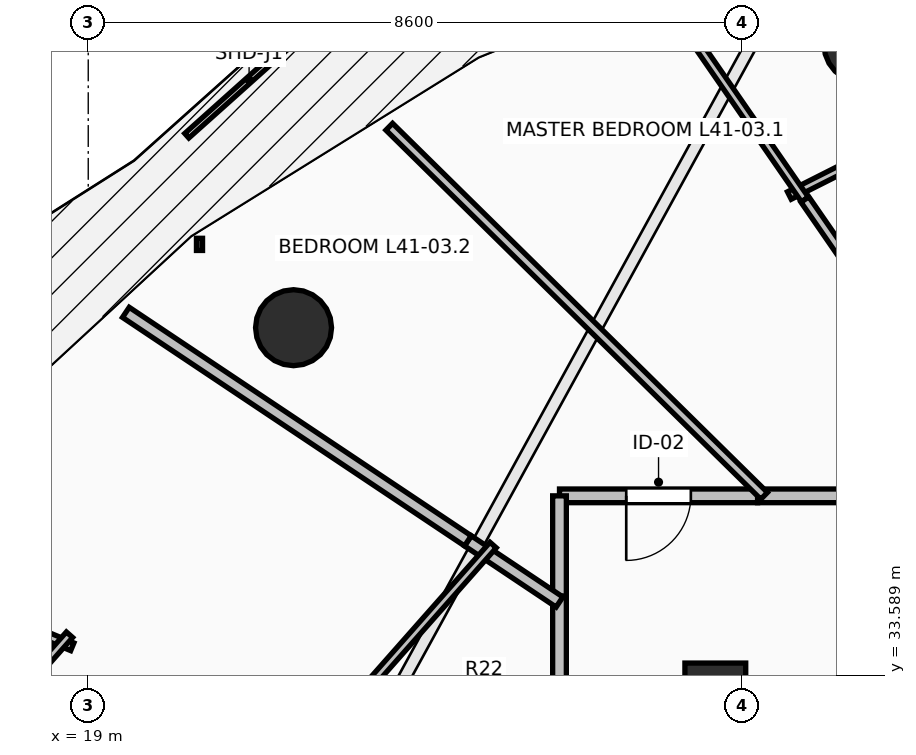
"""IFC4 building model, lengths in metres.
Left out: names, types, materials, properties, quantities, classifications, styles, units other than length and angle.
Written with IfcOpenShell. Run it as: python <this file> out.ifc"""

import sys

from ifc_helpers import new_model, si_unit, direction, frame, frame_2d, origin, origin_2d, place, context, subcontext, project, spatial, rectangle, circle, extrude, element, fill, save


model = new_model("IFC4")
c1 = context("Model", 3, precision=1e-05, world=origin(), true_north=direction((0.0, 1.0)))
c2 = subcontext(c1, "Body", "Model", "MODEL_VIEW")
j1 = project(units=[si_unit("LENGTHUNIT", "METRE"), si_unit("PLANEANGLEUNIT", "RADIAN")], contexts=[c1])
p1 = place(None, origin())
s1 = spatial("IfcSite", under=j1, at=p1, CompositionType="ELEMENT")
p2 = place(p1, origin())
s2 = spatial("IfcBuilding", under=s1, at=p2, CompositionType="ELEMENT")
p3 = place(p2, frame((0.0, 0.0, 153.6)))
s3 = spatial("IfcBuildingStorey", under=s2, at=p3, CompositionType="ELEMENT", Elevation=153.6)
for number, where, z_axis, x_axis in (
    (1, (29.179, 41.891, 0.0), (0.0, 0.0, 1.0), (-0.383, 0.924, 0.0)),
    (2, (21.701, 38.162, 0.0), (0.0, 0.0, 1.0), (-0.707, 0.707, 0.0)),
):
    element("IfcColumn", number, at=place(p3, frame(where, z_axis=z_axis, x_axis=x_axis)), inside=s3, PredefinedType="COLUMN", context=c2, shape_type="SweptSolid", body=[
        extrude(circle(Radius=0.5, at=origin_2d()), origin(), (0.0, 0.0, 1.0), 3.5),
    ])
p4 = place(p3, frame((27.25, 33.15, 0.0), z_axis=(0.0, 0.0, 1.0), x_axis=(1.0, 0.0, 0.0)))
e3 = element("IfcColumn", 3, at=p4, inside=s3, PredefinedType="PILASTER", context=c2, shape_type="SweptSolid", body=[
    extrude(rectangle(XDim=0.8, YDim=1.2, at=origin_2d()), origin(), (0.0, 0.0, 1.0), 3.5),
])
p5 = place(p3, frame((31.05, 35.95, 0.0), z_axis=(0.0, 0.0, 1.0), x_axis=(-1.0, 0.0, 0.0)))
e4 = element("IfcWall", 4, at=p5, inside=s3, PredefinedType="PARTITIONING", context=c2, shape_type="SweptSolid", body=[
    extrude(rectangle(XDim=3.244, YDim=0.18, at=frame_2d((1.622, 0.0))), origin(), (0.0, 0.0, 1.0), 2.432),
])
p6 = place(p3, frame((27.806, 35.95, 0.0), z_axis=(0.0, 0.0, 1.0), x_axis=(-1.0, 0.0, 0.0)))
e5 = element("IfcWall", 5, at=p6, inside=s3, PredefinedType="PARTITIONING", context=c2, shape_type="SweptSolid", body=[
    extrude(rectangle(XDim=2.606, YDim=0.18, at=frame_2d((1.303, 0.0))), origin(), (0.0, 0.0, 1.0), 2.432),
])
p7 = place(p6, frame((0.878, 0.0, 0.0)))
e6 = element("IfcOpeningElement", 6, at=p7, cuts=e5, PredefinedType="OPENING", context=c2, shape_type="SweptSolid", body=[
    extrude(rectangle(XDim=0.85, YDim=2.1, at=frame_2d((0.425, 1.05))), frame((0.0, 0.105, 0.0), z_axis=(0.0, -1.0, 0.0), x_axis=(1.0, 0.0, 0.0)), (0.0, 0.0, 1.0), 0.21),
])
p8 = place(p3, frame((25.2, 35.95, 0.0), z_axis=(0.0, 0.0, 1.0), x_axis=(0.0, -1.0, 0.0)))
e7 = element("IfcWall", 7, at=p8, inside=s3, PredefinedType="PARTITIONING", context=c2, shape_type="SweptSolid", body=[
    extrude(rectangle(XDim=1.457, YDim=0.18, at=frame_2d((0.729, 0.0))), origin(), (0.0, 0.0, 1.0), 2.432),
])
p9 = place(p3, frame((25.2, 34.633, 0.0), z_axis=(0.0, 0.0, 1.0), x_axis=(0.0, -1.0, 0.0)))
e8 = element("IfcWall", 8, at=p9, inside=s3, PredefinedType="PARTITIONING", context=c2, shape_type="SweptSolid", body=[
    extrude(rectangle(XDim=3.155, YDim=0.18, at=frame_2d((1.578, 0.0))), origin(), (0.0, 0.0, 1.0), 2.432),
])
p10 = place(p3, frame((30.043, 40.819, 0.0), z_axis=(0.0, 0.0, 1.0), x_axis=(-0.892695055898, -0.450661222179, 0.0)))
e9 = element("IfcWall", 9, at=p10, inside=s3, PredefinedType="PARTITIONING", context=c2, shape_type="SweptSolid", body=[
    extrude(rectangle(XDim=2.038, YDim=0.11, at=frame_2d((1.019, 0.0))), origin(), (0.0, 0.0, 1.0), 2.432),
])
p11 = place(p3, frame((28.429, 39.849, 0.0), z_axis=(0.0, 0.0, 1.0), x_axis=(-0.568554374161, 0.822645685349, 0.0)))
e10 = element("IfcWall", 10, at=p11, inside=s3, PredefinedType="PARTITIONING", context=c2, shape_type="SweptSolid", body=[
    extrude(rectangle(XDim=3.409, YDim=0.11, at=frame_2d((1.705, 0.0))), origin(), (0.0, 0.0, 1.0), 2.728),
])
p12 = place(p3, frame((28.428, 39.849, 0.0), z_axis=(0.0, 0.0, 1.0), x_axis=(0.568542808453, -0.822653678626, 0.0)))
e11 = element("IfcWall", 11, at=p12, inside=s3, PredefinedType="PARTITIONING", context=c2, shape_type="SweptSolid", body=[
    extrude(rectangle(XDim=4.74, YDim=0.125, at=frame_2d((2.37, 0.0))), origin(), (0.0, 0.0, 1.0), 2.432),
])
p13 = place(p12, frame((1.92, 0.0, 0.0)))
e12 = element("IfcOpeningElement", 12, at=p13, cuts=e11, PredefinedType="OPENING", context=c2, shape_type="SweptSolid", body=[
    extrude(rectangle(XDim=0.9, YDim=2.1, at=frame_2d((0.45, 1.05))), frame((0.0, 0.077, 0.0), z_axis=(0.0, -1.0, 0.0), x_axis=(1.0, 0.0, 0.0)), (0.0, 0.0, 1.0), 0.155),
])
p14 = place(p3, frame((22.96, 40.806, 0.0), z_axis=(0.0, 0.0, 1.0), x_axis=(0.712587980465, -0.70158276069, 0.0)))
e13 = element("IfcWall", 13, at=p14, inside=s3, PredefinedType="PARTITIONING", context=c2, shape_type="SweptSolid", body=[
    extrude(rectangle(XDim=6.921, YDim=0.125, at=frame_2d((3.461, 0.0))), origin(), (0.0, 0.0, 1.0), 2.432),
])
p15 = place(p3, frame((23.995, 35.358, 0.0), z_axis=(0.0, 0.0, 1.0), x_axis=(0.831505536539, -0.555516464837, 0.0)))
e14 = element("IfcWall", 14, at=p15, inside=s3, PredefinedType="PARTITIONING", context=c2, shape_type="SweptSolid", body=[
    extrude(rectangle(XDim=1.449, YDim=0.16, at=frame_2d((0.725, 0.0))), origin(), (0.0, 0.0, 1.0), 3.24),
])
p16 = place(p3, frame((19.495, 38.364, 0.0), z_axis=(0.0, 0.0, 1.0), x_axis=(0.831529389247, -0.55548076008, 0.0)))
e15 = element("IfcWall", 15, at=p16, inside=s3, PredefinedType="PARTITIONING", context=c2, shape_type="SweptSolid", body=[
    extrude(rectangle(XDim=5.412, YDim=0.16, at=frame_2d((2.706, 0.0))), origin(), (0.0, 0.0, 1.0), 2.728),
])
p17 = place(p3, frame((22.081, 32.761, 0.0), z_axis=(0.0, 0.0, 1.0), x_axis=(0.662023888113, 0.749482736004, 0.0)))
e16 = element("IfcWall", 16, at=p17, inside=s3, PredefinedType="PARTITIONING", context=c2, shape_type="SweptSolid", body=[
    extrude(rectangle(XDim=3.392, YDim=0.11, at=frame_2d((1.696, 0.0))), origin(), (0.0, 0.0, 1.0), 3.24),
])
p18 = place(p3, frame((16.231, 35.026, 0.0), z_axis=(0.0, 0.0, 1.0), x_axis=(0.923742873908, -0.383013188943, 0.0)))
e17 = element("IfcWall", 17, at=p18, inside=s3, PredefinedType="PARTITIONING", context=c2, shape_type="SweptSolid", body=[
    extrude(rectangle(XDim=2.771, YDim=0.11, at=frame_2d((1.385, 0.0))), origin(), (0.0, 0.0, 1.0), 2.728),
])
p19 = place(p3, frame((18.754, 34.123, 0.0), z_axis=(0.0, 0.0, 1.0), x_axis=(-0.66207590595, -0.749436785033, 0.0)))
e18 = element("IfcWall", 18, at=p19, inside=s3, PredefinedType="PARTITIONING", context=c2, shape_type="SweptSolid", body=[
    extrude(rectangle(XDim=2.328, YDim=0.11, at=frame_2d((1.164, 0.0))), origin(), (0.0, 0.0, 1.0), 2.432),
])
p20 = place(p7, origin())
e19 = element("IfcDoor", 19, at=p20, inside=s3, OperationType="SINGLE_SWING_RIGHT", PredefinedType="DOOR", context=c2, shape_type="SweptSolid", body=[
    extrude(rectangle(XDim=0.85, YDim=2.1, at=frame_2d((0.425, 1.05))), frame((0.0, 0.025, 0.0), z_axis=(0.0, -1.0, 0.0), x_axis=(1.0, 0.0, 0.0)), (0.0, 0.0, 1.0), 0.05),
])
fill(e6, e19)
save(model, sys.argv[1])
